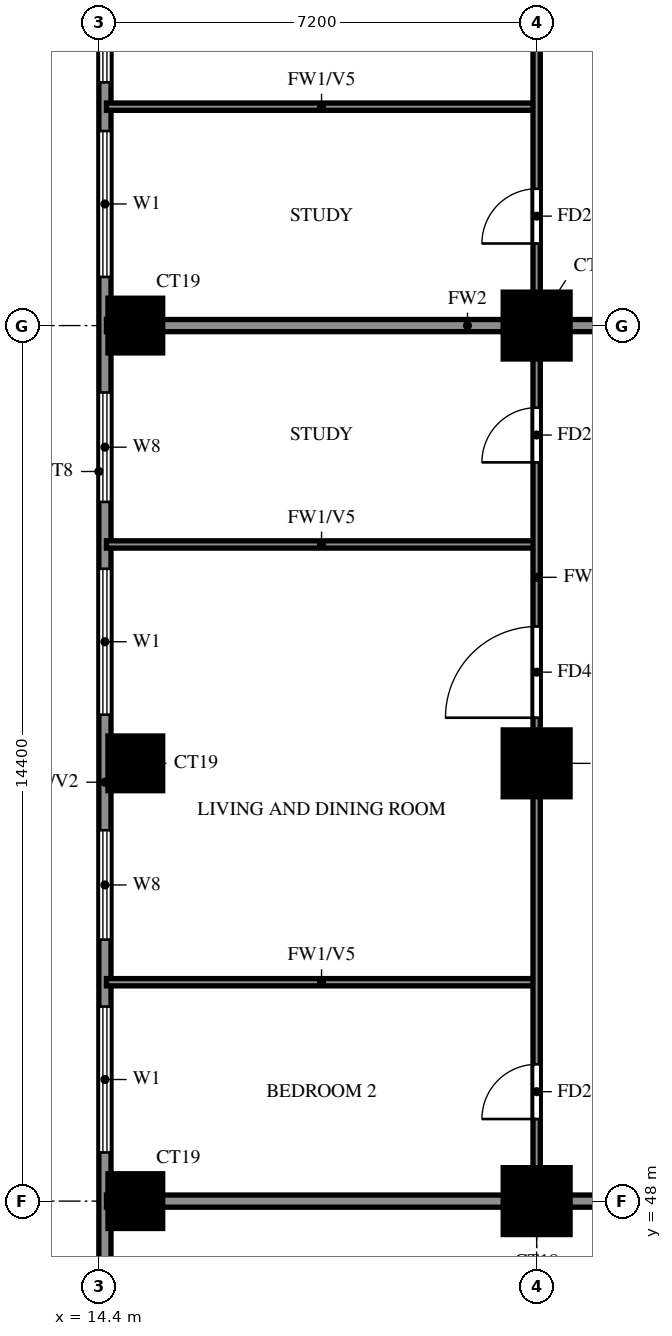
"""IFC4 building model, lengths in metres.
Left out: names, types, materials, properties, quantities, classifications, styles, units other than length and angle.
Written with IfcOpenShell. Run it as: python <this file> out.ifc"""

import sys

from ifc_helpers import new_model, si_unit, direction, frame, frame_2d, origin, origin_2d, place, context, subcontext, project, spatial, rectangle, extrude, source, transform, mapped, element, fill, save


model = new_model("IFC4")
c1 = context("Model", 3, precision=1e-05, world=origin(), true_north=direction((0.0, 1.0)))
c2 = subcontext(c1, "Body", "Model", "MODEL_VIEW")
j1 = project(units=[si_unit("LENGTHUNIT", "METRE"), si_unit("PLANEANGLEUNIT", "RADIAN")], contexts=[c1])
p1 = place(None, origin())
s1 = spatial("IfcSite", under=j1, at=p1, CompositionType="ELEMENT")
p2 = place(p1, origin())
s2 = spatial("IfcBuilding", under=s1, at=p2, CompositionType="ELEMENT")
p3 = place(p2, frame((0.0, 0.0, 116.5)))
s3 = spatial("IfcBuildingStorey", under=s2, at=p3, CompositionType="ELEMENT", Elevation=116.5)
m1 = source(origin(), c2, "Body", "SweptSolid", [
    extrude(rectangle(XDim=0.9, YDim=0.9, at=origin_2d()), origin(), (0.0, 0.0, 1.0), 3.2),
])
p4 = place(p3, frame((15.0, 48.0, 0.0), z_axis=(0.0, 0.0, 1.0), x_axis=(1.0, 0.0, 0.0)))
e1 = element("IfcColumn", 1, at=p4, inside=s3, PredefinedType="COLUMN", context=c2, shape_type="MappedRepresentation", body=[
    mapped(m1, transform((0.0, 0.0, 0.0))),
])
m2 = source(origin(), c2, "Body", "SweptSolid", [
    extrude(rectangle(XDim=1.1, YDim=1.1, at=origin_2d()), origin(), (0.0, 0.0, 1.0), 3.2),
])
p5 = place(p3, frame((21.6, 48.0, 0.0), z_axis=(0.0, 0.0, 1.0), x_axis=(1.0, 0.0, 0.0)))
e2 = element("IfcColumn", 2, at=p5, inside=s3, PredefinedType="COLUMN", context=c2, shape_type="MappedRepresentation", body=[
    mapped(m2, transform((0.0, 0.0, 0.0))),
])
p6 = place(p3, frame((15.0, 55.2, 0.0), z_axis=(0.0, 0.0, 1.0), x_axis=(1.0, 0.0, 0.0)))
e3 = element("IfcColumn", 3, at=p6, inside=s3, PredefinedType="COLUMN", context=c2, shape_type="MappedRepresentation", body=[
    mapped(m1, transform((0.0, 0.0, 0.0))),
])
p7 = place(p3, frame((21.6, 55.2, 0.0), z_axis=(0.0, 0.0, 1.0), x_axis=(1.0, 0.0, 0.0)))
e4 = element("IfcColumn", 4, at=p7, inside=s3, PredefinedType="COLUMN", context=c2, shape_type="MappedRepresentation", body=[
    mapped(m2, transform((0.0, 0.0, 0.0))),
])
p8 = place(p3, frame((15.0, 62.4, 0.0), z_axis=(0.0, 0.0, 1.0), x_axis=(1.0, 0.0, 0.0)))
e5 = element("IfcColumn", 5, at=p8, inside=s3, PredefinedType="COLUMN", context=c2, shape_type="MappedRepresentation", body=[
    mapped(m1, transform((0.0, 0.0, 0.0))),
])
p9 = place(p3, frame((21.6, 62.4, 0.0), z_axis=(0.0, 0.0, 1.0), x_axis=(1.0, 0.0, 0.0)))
e6 = element("IfcColumn", 6, at=p9, inside=s3, PredefinedType="COLUMN", context=c2, shape_type="MappedRepresentation", body=[
    mapped(m2, transform((0.0, 0.0, 0.0))),
])
p10 = place(p3, frame((14.5, 76.6, 0.0), z_axis=(0.0, 0.0, 1.0), x_axis=(0.0, -1.0, 0.0)))
e7 = element("IfcWall", 7, at=p10, inside=s3, PredefinedType="SOLIDWALL", context=c2, shape_type="SweptSolid", body=[
    extrude(rectangle(XDim=33.4, YDim=0.2, at=frame_2d((16.7, 0.0))), origin(), (0.0, 0.0, 1.0), 3.2),
])
p11 = place(p10, frame((29.9, 0.0, 0.6)))
e8 = element("IfcOpeningElement", 8, at=p11, cuts=e7, PredefinedType="OPENING", context=c2, shape_type="SweptSolid", body=[
    extrude(rectangle(XDim=2.4, YDim=2.4, at=frame_2d((1.2, 1.2))), frame((0.0, 0.11, 0.0), z_axis=(0.0, -1.0, 0.0), x_axis=(1.0, 0.0, 0.0)), (0.0, 0.0, 1.0), 0.22),
])
p12 = place(p10, frame((25.4, 0.0, 0.6)))
e9 = element("IfcOpeningElement", 9, at=p12, cuts=e7, PredefinedType="OPENING", context=c2, shape_type="SweptSolid", body=[
    extrude(rectangle(XDim=2.4, YDim=2.4, at=frame_2d((1.2, 1.2))), frame((0.0, 0.11, 0.0), z_axis=(0.0, -1.0, 0.0), x_axis=(1.0, 0.0, 0.0)), (0.0, 0.0, 1.0), 0.22),
])
p13 = place(p10, frame((18.2, 0.0, 0.6)))
e10 = element("IfcOpeningElement", 10, at=p13, cuts=e7, PredefinedType="OPENING", context=c2, shape_type="SweptSolid", body=[
    extrude(rectangle(XDim=2.4, YDim=2.4, at=frame_2d((1.2, 1.2))), frame((0.0, 0.11, 0.0), z_axis=(0.0, -1.0, 0.0), x_axis=(1.0, 0.0, 0.0)), (0.0, 0.0, 1.0), 0.22),
])
p14 = place(p10, frame((22.5, 0.0, 0.6)))
e11 = element("IfcOpeningElement", 11, at=p14, cuts=e7, PredefinedType="OPENING", context=c2, shape_type="SweptSolid", body=[
    extrude(rectangle(XDim=1.8, YDim=2.4, at=frame_2d((0.9, 1.2))), frame((0.0, 0.11, 0.0), z_axis=(0.0, -1.0, 0.0), x_axis=(1.0, 0.0, 0.0)), (0.0, 0.0, 1.0), 0.22),
])
p15 = place(p10, frame((15.3, 0.0, 0.6)))
e12 = element("IfcOpeningElement", 12, at=p15, cuts=e7, PredefinedType="OPENING", context=c2, shape_type="SweptSolid", body=[
    extrude(rectangle(XDim=1.8, YDim=2.4, at=frame_2d((0.9, 1.2))), frame((0.0, 0.11, 0.0), z_axis=(0.0, -1.0, 0.0), x_axis=(1.0, 0.0, 0.0)), (0.0, 0.0, 1.0), 0.22),
])
p16 = place(p10, frame((11.0, 0.0, 0.6)))
e13 = element("IfcOpeningElement", 13, at=p16, cuts=e7, PredefinedType="OPENING", context=c2, shape_type="SweptSolid", body=[
    extrude(rectangle(XDim=2.4, YDim=2.4, at=frame_2d((1.2, 1.2))), frame((0.0, 0.11, 0.0), z_axis=(0.0, -1.0, 0.0), x_axis=(1.0, 0.0, 0.0)), (0.0, 0.0, 1.0), 0.22),
])
p17 = place(p10, frame((7.8, 0.0, 0.6)))
e14 = element("IfcOpeningElement", 14, at=p17, cuts=e7, PredefinedType="OPENING", context=c2, shape_type="SweptSolid", body=[
    extrude(rectangle(XDim=2.4, YDim=2.4, at=frame_2d((1.2, 1.2))), frame((0.0, 0.11, 0.0), z_axis=(0.0, -1.0, 0.0), x_axis=(1.0, 0.0, 0.0)), (0.0, 0.0, 1.0), 0.22),
])
p18 = place(p10, frame((4.55, 0.0, 1.5)))
e15 = element("IfcOpeningElement", 15, at=p18, cuts=e7, PredefinedType="OPENING", context=c2, shape_type="SweptSolid", body=[
    extrude(rectangle(XDim=0.9, YDim=0.9, at=frame_2d((0.45, 0.45))), frame((0.0, 0.11, 0.0), z_axis=(0.0, -1.0, 0.0), x_axis=(1.0, 0.0, 0.0)), (0.0, 0.0, 1.0), 0.22),
])
p19 = place(p10, frame((0.6, 0.0, 0.6)))
e16 = element("IfcOpeningElement", 16, at=p19, cuts=e7, PredefinedType="OPENING", context=c2, shape_type="SweptSolid", body=[
    extrude(rectangle(XDim=2.4, YDim=2.4, at=frame_2d((1.2, 1.2))), frame((0.0, 0.11, 0.0), z_axis=(0.0, -1.0, 0.0), x_axis=(1.0, 0.0, 0.0)), (0.0, 0.0, 1.0), 0.22),
])
p20 = place(p3, frame((14.525, 48.0, 0.0), z_axis=(0.0, 0.0, 1.0), x_axis=(1.0, 0.0, 0.0)))
e17 = element("IfcWall", 17, at=p20, inside=s3, PredefinedType="SOLIDWALL", context=c2, shape_type="SweptSolid", body=[
    extrude(rectangle(XDim=19.075, YDim=0.2, at=frame_2d((9.538, 0.0))), origin(), (0.0, 0.0, 1.0), 3.2),
])
p21 = place(p3, frame((14.525, 62.4, 0.0), z_axis=(0.0, 0.0, 1.0), x_axis=(1.0, 0.0, 0.0)))
e18 = element("IfcWall", 18, at=p21, inside=s3, PredefinedType="SOLIDWALL", context=c2, shape_type="SweptSolid", body=[
    extrude(rectangle(XDim=11.875, YDim=0.2, at=frame_2d((5.938, 0.0))), origin(), (0.0, 0.0, 1.0), 3.2),
])
for number, where, z_axis, x_axis in (
    (19, (14.525, 51.6, 0.0), (0.0, 0.0, 1.0), (1.0, 0.0, 0.0)),
    (20, (14.525, 58.8, 0.0), (0.0, 0.0, 1.0), (1.0, 0.0, 0.0)),
    (21, (14.525, 66.0, 0.0), (0.0, 0.0, 1.0), (1.0, 0.0, 0.0)),
):
    element("IfcWall", number, at=place(p3, frame(where, z_axis=z_axis, x_axis=x_axis)), inside=s3, PredefinedType="PARTITIONING", context=c2, shape_type="SweptSolid", body=[
        extrude(rectangle(XDim=7.075, YDim=0.12, at=frame_2d((3.538, 0.0))), origin(), (0.0, 0.0, 1.0), 2.3),
    ])
p22 = place(p3, frame((21.6, 48.0, 0.0), z_axis=(0.0, 0.0, 1.0), x_axis=(0.0, 1.0, 0.0)))
e22 = element("IfcWall", 22, at=p22, inside=s3, PredefinedType="PARTITIONING", context=c2, shape_type="SweptSolid", body=[
    extrude(rectangle(XDim=21.6, YDim=0.12, at=frame_2d((10.8, 0.0))), origin(), (0.0, 0.0, 1.0), 3.2),
])
p23 = place(p22, frame((1.35, 0.0, 0.0)))
e23 = element("IfcOpeningElement", 23, at=p23, cuts=e22, PredefinedType="OPENING", context=c2, shape_type="SweptSolid", body=[
    extrude(rectangle(XDim=0.9, YDim=2.1, at=frame_2d((0.45, 1.05))), frame((0.0, 0.07, 0.0), z_axis=(0.0, -1.0, 0.0), x_axis=(1.0, 0.0, 0.0)), (0.0, 0.0, 1.0), 0.14),
])
p24 = place(p22, frame((7.95, 0.0, 0.0)))
e24 = element("IfcOpeningElement", 24, at=p24, cuts=e22, PredefinedType="OPENING", context=c2, shape_type="SweptSolid", body=[
    extrude(rectangle(XDim=1.5, YDim=2.1, at=frame_2d((0.75, 1.05))), frame((0.0, 0.07, 0.0), z_axis=(0.0, -1.0, 0.0), x_axis=(1.0, 0.0, 0.0)), (0.0, 0.0, 1.0), 0.14),
])
p25 = place(p22, frame((12.15, 0.0, 0.0)))
e25 = element("IfcOpeningElement", 25, at=p25, cuts=e22, PredefinedType="OPENING", context=c2, shape_type="SweptSolid", body=[
    extrude(rectangle(XDim=0.9, YDim=2.1, at=frame_2d((0.45, 1.05))), frame((0.0, 0.07, 0.0), z_axis=(0.0, -1.0, 0.0), x_axis=(1.0, 0.0, 0.0)), (0.0, 0.0, 1.0), 0.14),
])
p26 = place(p22, frame((15.75, 0.0, 0.0)))
e26 = element("IfcOpeningElement", 26, at=p26, cuts=e22, PredefinedType="OPENING", context=c2, shape_type="SweptSolid", body=[
    extrude(rectangle(XDim=0.9, YDim=2.1, at=frame_2d((0.45, 1.05))), frame((0.0, 0.07, 0.0), z_axis=(0.0, -1.0, 0.0), x_axis=(1.0, 0.0, 0.0)), (0.0, 0.0, 1.0), 0.14),
])
p27 = place(p22, frame((19.35, 0.0, 0.0)))
e27 = element("IfcOpeningElement", 27, at=p27, cuts=e22, PredefinedType="OPENING", context=c2, shape_type="SweptSolid", body=[
    extrude(rectangle(XDim=0.9, YDim=2.1, at=frame_2d((0.45, 1.05))), frame((0.0, 0.07, 0.0), z_axis=(0.0, -1.0, 0.0), x_axis=(1.0, 0.0, 0.0)), (0.0, 0.0, 1.0), 0.14),
])
p28 = place(p12, origin())
e28 = element("IfcWindow", 28, at=p28, inside=s3, PartitioningType="DOUBLE_PANEL_VERTICAL", PredefinedType="WINDOW", context=c2, shape_type="SweptSolid", body=[
    extrude(rectangle(XDim=2.4, YDim=2.4, at=frame_2d((1.2, 1.2))), frame((0.0, 0.03, 0.0), z_axis=(0.0, -1.0, 0.0), x_axis=(1.0, 0.0, 0.0)), (0.0, 0.0, 1.0), 0.06),
])
fill(e9, e28)
p29 = place(p13, origin())
e29 = element("IfcWindow", 29, at=p29, inside=s3, PartitioningType="DOUBLE_PANEL_VERTICAL", PredefinedType="WINDOW", context=c2, shape_type="SweptSolid", body=[
    extrude(rectangle(XDim=2.4, YDim=2.4, at=frame_2d((1.2, 1.2))), frame((0.0, 0.03, 0.0), z_axis=(0.0, -1.0, 0.0), x_axis=(1.0, 0.0, 0.0)), (0.0, 0.0, 1.0), 0.06),
])
fill(e10, e29)
p30 = place(p14, origin())
e30 = element("IfcWindow", 30, at=p30, inside=s3, PartitioningType="DOUBLE_PANEL_VERTICAL", PredefinedType="WINDOW", context=c2, shape_type="SweptSolid", body=[
    extrude(rectangle(XDim=1.8, YDim=2.4, at=frame_2d((0.9, 1.2))), frame((0.0, 0.03, 0.0), z_axis=(0.0, -1.0, 0.0), x_axis=(1.0, 0.0, 0.0)), (0.0, 0.0, 1.0), 0.06),
])
fill(e11, e30)
p31 = place(p15, origin())
e31 = element("IfcWindow", 31, at=p31, inside=s3, PartitioningType="DOUBLE_PANEL_VERTICAL", PredefinedType="WINDOW", context=c2, shape_type="SweptSolid", body=[
    extrude(rectangle(XDim=1.8, YDim=2.4, at=frame_2d((0.9, 1.2))), frame((0.0, 0.03, 0.0), z_axis=(0.0, -1.0, 0.0), x_axis=(1.0, 0.0, 0.0)), (0.0, 0.0, 1.0), 0.06),
])
fill(e12, e31)
p32 = place(p16, origin())
e32 = element("IfcWindow", 32, at=p32, inside=s3, PartitioningType="DOUBLE_PANEL_VERTICAL", PredefinedType="WINDOW", context=c2, shape_type="SweptSolid", body=[
    extrude(rectangle(XDim=2.4, YDim=2.4, at=frame_2d((1.2, 1.2))), frame((0.0, 0.03, 0.0), z_axis=(0.0, -1.0, 0.0), x_axis=(1.0, 0.0, 0.0)), (0.0, 0.0, 1.0), 0.06),
])
fill(e13, e32)
p33 = place(p17, origin())
e33 = element("IfcWindow", 33, at=p33, inside=s3, PartitioningType="DOUBLE_PANEL_VERTICAL", PredefinedType="WINDOW", context=c2, shape_type="SweptSolid", body=[
    extrude(rectangle(XDim=2.4, YDim=2.4, at=frame_2d((1.2, 1.2))), frame((0.0, 0.03, 0.0), z_axis=(0.0, -1.0, 0.0), x_axis=(1.0, 0.0, 0.0)), (0.0, 0.0, 1.0), 0.06),
])
fill(e14, e33)
p34 = place(p23, origin())
e34 = element("IfcDoor", 34, at=p34, inside=s3, OperationType="SINGLE_SWING_LEFT", PredefinedType="DOOR", context=c2, shape_type="SweptSolid", body=[
    extrude(rectangle(XDim=0.9, YDim=2.1, at=frame_2d((0.45, 1.05))), frame((0.0, 0.025, 0.0), z_axis=(0.0, -1.0, 0.0), x_axis=(1.0, 0.0, 0.0)), (0.0, 0.0, 1.0), 0.05),
])
fill(e23, e34)
p35 = place(p24, origin())
e35 = element("IfcDoor", 35, at=p35, inside=s3, OperationType="SINGLE_SWING_LEFT", PredefinedType="DOOR", context=c2, shape_type="SweptSolid", body=[
    extrude(rectangle(XDim=1.5, YDim=2.1, at=frame_2d((0.75, 1.05))), frame((0.0, 0.025, 0.0), z_axis=(0.0, -1.0, 0.0), x_axis=(1.0, 0.0, 0.0)), (0.0, 0.0, 1.0), 0.05),
])
fill(e24, e35)
p36 = place(p25, origin())
e36 = element("IfcDoor", 36, at=p36, inside=s3, OperationType="SINGLE_SWING_LEFT", PredefinedType="DOOR", context=c2, shape_type="SweptSolid", body=[
    extrude(rectangle(XDim=0.9, YDim=2.1, at=frame_2d((0.45, 1.05))), frame((0.0, 0.025, 0.0), z_axis=(0.0, -1.0, 0.0), x_axis=(1.0, 0.0, 0.0)), (0.0, 0.0, 1.0), 0.05),
])
fill(e25, e36)
p37 = place(p26, origin())
e37 = element("IfcDoor", 37, at=p37, inside=s3, OperationType="SINGLE_SWING_LEFT", PredefinedType="DOOR", context=c2, shape_type="SweptSolid", body=[
    extrude(rectangle(XDim=0.9, YDim=2.1, at=frame_2d((0.45, 1.05))), frame((0.0, 0.025, 0.0), z_axis=(0.0, -1.0, 0.0), x_axis=(1.0, 0.0, 0.0)), (0.0, 0.0, 1.0), 0.05),
])
fill(e26, e37)
save(model, sys.argv[1])
